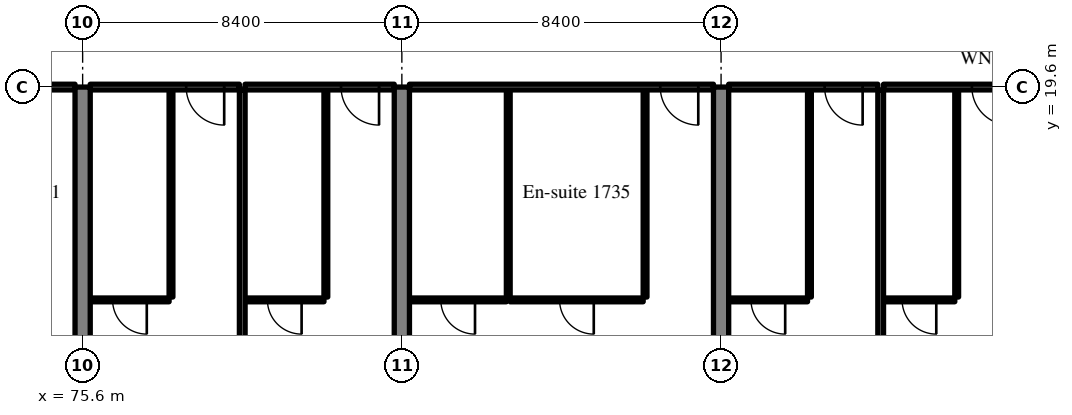
"""IFC4 building model, lengths in metres.
Left out: names, types, materials, properties, quantities, classifications, styles, units other than length and angle.
Written with IfcOpenShell. Run it as: python <this file> out.ifc"""

import sys

from ifc_helpers import new_model, si_unit, direction, frame, frame_2d, origin, place, context, subcontext, project, spatial, rectangle, extrude, source, transform, mapped, element, fill, save


model = new_model("IFC4")
c1 = context("Model", 3, precision=1e-05, world=origin(), true_north=direction((0.0, 1.0)))
c2 = subcontext(c1, "Body", "Model", "MODEL_VIEW")
j1 = project(units=[si_unit("LENGTHUNIT", "METRE"), si_unit("PLANEANGLEUNIT", "RADIAN")], contexts=[c1])
p1 = place(None, origin())
s1 = spatial("IfcSite", under=j1, at=p1, CompositionType="ELEMENT")
p2 = place(p1, origin())
s2 = spatial("IfcBuilding", under=s1, at=p2, CompositionType="ELEMENT")
p3 = place(p2, frame((0.0, 0.0, 73.4)))
s3 = spatial("IfcBuildingStorey", under=s2, at=p3, CompositionType="ELEMENT", Elevation=73.4)
m1 = source(origin(), c2, "Body", "SweptSolid", [
    extrude(rectangle(XDim=19.6, YDim=0.4, at=frame_2d((9.8, 0.0))), origin(), (0.0, 0.0, 1.0), 3.52),
])
for number, where, z_axis, x_axis in (
    (1, (75.6, 0.0, 0.0), (0.0, 0.0, 1.0), (0.0, 1.0, 0.0)),
    (2, (84.0, 0.0, 0.0), (0.0, 0.0, 1.0), (0.0, 1.0, 0.0)),
    (3, (92.4, 0.0, 0.0), (0.0, 0.0, 1.0), (0.0, 1.0, 0.0)),
):
    element("IfcWall", number, at=place(p3, frame(where, z_axis=z_axis, x_axis=x_axis)), inside=s3, PredefinedType="SHEAR", context=c2, shape_type="MappedRepresentation", body=[
        mapped(m1, transform((0.0, 0.0, 0.0), scale=1.0)),
    ])
m2 = source(origin(), c2, "Body", "SweptSolid", [
    extrude(rectangle(XDim=8.0, YDim=0.15, at=frame_2d((4.0, 0.0))), origin(), (0.0, 0.0, 1.0), 2.82),
])
p4 = place(p3, frame((67.4, 19.6, 0.0), z_axis=(0.0, 0.0, 1.0), x_axis=(1.0, 0.0, 0.0)))
e4 = element("IfcWall", 4, at=p4, inside=s3, PredefinedType="PARTITIONING", context=c2, shape_type="MappedRepresentation", body=[
    mapped(m2, transform((0.0, 0.0, 0.0), scale=1.0)),
])
m3 = source(origin(), c2, "Body", "SweptSolid", [
    extrude(rectangle(XDim=1.8, YDim=2.1, at=frame_2d((0.9, 1.05))), frame((0.0, 0.085, 0.0), z_axis=(0.0, -1.0, 0.0), x_axis=(1.0, 0.0, 0.0)), (0.0, 0.0, 1.0), 0.17),
])
p5 = place(p4, frame((3.1, 0.0, 0.0)))
e5 = element("IfcOpeningElement", 5, at=p5, cuts=e4, PredefinedType="OPENING", context=c2, shape_type="MappedRepresentation", body=[
    mapped(m3, transform((0.0, 0.0, 0.0), scale=1.0)),
])
m4 = source(origin(), c2, "Body", "SweptSolid", [
    extrude(rectangle(XDim=5.45, YDim=0.1, at=frame_2d((2.725, 0.0))), origin(), (0.0, 0.0, 1.0), 3.52),
])
p6 = place(p3, frame((77.925, 14.075, 0.0), z_axis=(0.0, 0.0, 1.0), x_axis=(0.0, 1.0, 0.0)))
e6 = element("IfcWall", 6, at=p6, inside=s3, PredefinedType="PARTITIONING", context=c2, shape_type="MappedRepresentation", body=[
    mapped(m4, transform((0.0, 0.0, 0.0), scale=1.0)),
])
m5 = source(origin(), c2, "Body", "SweptSolid", [
    extrude(rectangle(XDim=2.075, YDim=0.1, at=frame_2d((1.038, 0.0))), origin(), (0.0, 0.0, 1.0), 3.52),
])
p7 = place(p3, frame((75.8, 14.0, 0.0), z_axis=(0.0, 0.0, 1.0), x_axis=(1.0, 0.0, 0.0)))
e7 = element("IfcWall", 7, at=p7, inside=s3, PredefinedType="PARTITIONING", context=c2, shape_type="MappedRepresentation", body=[
    mapped(m5, transform((0.0, 0.0, 0.0), scale=1.0)),
])
m6 = source(origin(), c2, "Body", "SweptSolid", [
    extrude(rectangle(XDim=0.9, YDim=2.1, at=frame_2d((0.45, 1.05))), frame((0.0, 0.06, 0.0), z_axis=(0.0, -1.0, 0.0), x_axis=(1.0, 0.0, 0.0)), (0.0, 0.0, 1.0), 0.12),
])
p8 = place(p7, frame((0.588, 0.0, 0.0)))
e8 = element("IfcOpeningElement", 8, at=p8, cuts=e7, PredefinedType="OPENING", context=c2, shape_type="MappedRepresentation", body=[
    mapped(m6, transform((0.0, 0.0, 0.0), scale=1.0)),
])
m7 = source(origin(), c2, "Body", "SweptSolid", [
    extrude(rectangle(XDim=3.925, YDim=0.15, at=frame_2d((1.962, 0.0))), origin(), (0.0, 0.0, 1.0), 2.82),
])
p9 = place(p3, frame((75.8, 19.6, 0.0), z_axis=(0.0, 0.0, 1.0), x_axis=(1.0, 0.0, 0.0)))
e9 = element("IfcWall", 9, at=p9, inside=s3, PredefinedType="PARTITIONING", context=c2, shape_type="MappedRepresentation", body=[
    mapped(m7, transform((0.0, 0.0, 0.0), scale=1.0)),
])
m8 = source(origin(), c2, "Body", "SweptSolid", [
    extrude(rectangle(XDim=1.0, YDim=2.1, at=frame_2d((0.5, 1.05))), frame((0.0, 0.085, 0.0), z_axis=(0.0, -1.0, 0.0), x_axis=(1.0, 0.0, 0.0)), (0.0, 0.0, 1.0), 0.17),
])
p10 = place(p9, frame((2.525, 0.0, 0.0)))
e10 = element("IfcOpeningElement", 10, at=p10, cuts=e9, PredefinedType="OPENING", context=c2, shape_type="MappedRepresentation", body=[
    mapped(m8, transform((0.0, 0.0, 0.0), scale=1.0)),
])
p11 = place(p3, frame((82.0, 14.075, 0.0), z_axis=(0.0, 0.0, 1.0), x_axis=(0.0, 1.0, 0.0)))
e11 = element("IfcWall", 11, at=p11, inside=s3, PredefinedType="PARTITIONING", context=c2, shape_type="MappedRepresentation", body=[
    mapped(m4, transform((0.0, 0.0, 0.0), scale=1.0)),
])
p12 = place(p3, frame((79.875, 14.0, 0.0), z_axis=(0.0, 0.0, 1.0), x_axis=(1.0, 0.0, 0.0)))
e12 = element("IfcWall", 12, at=p12, inside=s3, PredefinedType="PARTITIONING", context=c2, shape_type="MappedRepresentation", body=[
    mapped(m5, transform((0.0, 0.0, 0.0), scale=1.0)),
])
p13 = place(p12, frame((0.587, 0.0, 0.0)))
e13 = element("IfcOpeningElement", 13, at=p13, cuts=e12, PredefinedType="OPENING", context=c2, shape_type="MappedRepresentation", body=[
    mapped(m6, transform((0.0, 0.0, 0.0), scale=1.0)),
])
p14 = place(p3, frame((79.875, 19.6, 0.0), z_axis=(0.0, 0.0, 1.0), x_axis=(1.0, 0.0, 0.0)))
e14 = element("IfcWall", 14, at=p14, inside=s3, PredefinedType="PARTITIONING", context=c2, shape_type="MappedRepresentation", body=[
    mapped(m7, transform((0.0, 0.0, 0.0), scale=1.0)),
])
p15 = place(p14, frame((2.525, 0.0, 0.0)))
e15 = element("IfcOpeningElement", 15, at=p15, cuts=e14, PredefinedType="OPENING", context=c2, shape_type="MappedRepresentation", body=[
    mapped(m8, transform((0.0, 0.0, 0.0), scale=1.0)),
])
m9 = source(origin(), c2, "Body", "SweptSolid", [
    extrude(rectangle(XDim=18.725, YDim=0.15, at=frame_2d((9.362, 0.0))), origin(), (0.0, 0.0, 1.0), 3.52),
])
p16 = place(p3, frame((79.8, 0.8, 0.0), z_axis=(0.0, 0.0, 1.0), x_axis=(0.0, 1.0, 0.0)))
e16 = element("IfcWall", 16, at=p16, inside=s3, PredefinedType="PARTITIONING", context=c2, shape_type="MappedRepresentation", body=[
    mapped(m9, transform((0.0, 0.0, 0.0), scale=1.0)),
])
for number, where, z_axis, x_axis in (
    (17, (90.4, 14.075, 0.0), (0.0, 0.0, 1.0), (0.0, 1.0, 0.0)),
    (18, (86.8, 14.075, 0.0), (0.0, 0.0, 1.0), (0.0, 1.0, 0.0)),
):
    element("IfcWall", number, at=place(p3, frame(where, z_axis=z_axis, x_axis=x_axis)), inside=s3, PredefinedType="PARTITIONING", context=c2, shape_type="MappedRepresentation", body=[
        mapped(m4, transform((0.0, 0.0, 0.0), scale=1.0)),
    ])
m10 = source(origin(), c2, "Body", "SweptSolid", [
    extrude(rectangle(XDim=3.5, YDim=0.1, at=frame_2d((1.75, 0.0))), origin(), (0.0, 0.0, 1.0), 3.52),
])
p17 = place(p3, frame((86.85, 14.0, 0.0), z_axis=(0.0, 0.0, 1.0), x_axis=(1.0, 0.0, 0.0)))
e19 = element("IfcWall", 19, at=p17, inside=s3, PredefinedType="PARTITIONING", context=c2, shape_type="MappedRepresentation", body=[
    mapped(m10, transform((0.0, 0.0, 0.0), scale=1.0)),
])
p18 = place(p17, frame((1.3, 0.0, 0.0)))
e20 = element("IfcOpeningElement", 20, at=p18, cuts=e19, PredefinedType="OPENING", context=c2, shape_type="MappedRepresentation", body=[
    mapped(m6, transform((0.0, 0.0, 0.0), scale=1.0)),
])
m11 = source(origin(), c2, "Body", "SweptSolid", [
    extrude(rectangle(XDim=2.55, YDim=0.1, at=frame_2d((1.275, 0.0))), origin(), (0.0, 0.0, 1.0), 3.52),
])
p19 = place(p3, frame((84.2, 14.0, 0.0), z_axis=(0.0, 0.0, 1.0), x_axis=(1.0, 0.0, 0.0)))
e21 = element("IfcWall", 21, at=p19, inside=s3, PredefinedType="PARTITIONING", context=c2, shape_type="MappedRepresentation", body=[
    mapped(m11, transform((0.0, 0.0, 0.0), scale=1.0)),
])
p20 = place(p19, frame((0.825, 0.0, 0.0)))
e22 = element("IfcOpeningElement", 22, at=p20, cuts=e21, PredefinedType="OPENING", context=c2, shape_type="MappedRepresentation", body=[
    mapped(m6, transform((0.0, 0.0, 0.0), scale=1.0)),
])
p21 = place(p3, frame((84.2, 19.6, 0.0), z_axis=(0.0, 0.0, 1.0), x_axis=(1.0, 0.0, 0.0)))
e23 = element("IfcWall", 23, at=p21, inside=s3, PredefinedType="PARTITIONING", context=c2, shape_type="MappedRepresentation", body=[
    mapped(m2, transform((0.0, 0.0, 0.0), scale=1.0)),
])
p22 = place(p21, frame((6.6, 0.0, 0.0)))
e24 = element("IfcOpeningElement", 24, at=p22, cuts=e23, PredefinedType="OPENING", context=c2, shape_type="MappedRepresentation", body=[
    mapped(m8, transform((0.0, 0.0, 0.0), scale=1.0)),
])
p23 = place(p3, frame((94.725, 14.075, 0.0), z_axis=(0.0, 0.0, 1.0), x_axis=(0.0, 1.0, 0.0)))
e25 = element("IfcWall", 25, at=p23, inside=s3, PredefinedType="PARTITIONING", context=c2, shape_type="MappedRepresentation", body=[
    mapped(m4, transform((0.0, 0.0, 0.0), scale=1.0)),
])
p24 = place(p3, frame((92.6, 14.0, 0.0), z_axis=(0.0, 0.0, 1.0), x_axis=(1.0, 0.0, 0.0)))
e26 = element("IfcWall", 26, at=p24, inside=s3, PredefinedType="PARTITIONING", context=c2, shape_type="MappedRepresentation", body=[
    mapped(m5, transform((0.0, 0.0, 0.0), scale=1.0)),
])
p25 = place(p24, frame((0.587, 0.0, 0.0)))
e27 = element("IfcOpeningElement", 27, at=p25, cuts=e26, PredefinedType="OPENING", context=c2, shape_type="MappedRepresentation", body=[
    mapped(m6, transform((0.0, 0.0, 0.0), scale=1.0)),
])
m12 = source(origin(), c2, "Body", "SweptSolid", [
    extrude(rectangle(XDim=3.925, YDim=0.15, at=frame_2d((1.962, 0.0))), origin(), (0.0, 0.0, 1.0), 2.82),
])
p26 = place(p3, frame((92.6, 19.6, 0.0), z_axis=(0.0, 0.0, 1.0), x_axis=(1.0, 0.0, 0.0)))
e28 = element("IfcWall", 28, at=p26, inside=s3, PredefinedType="PARTITIONING", context=c2, shape_type="MappedRepresentation", body=[
    mapped(m12, transform((0.0, 0.0, 0.0), scale=1.0)),
])
p27 = place(p26, frame((2.525, 0.0, 0.0)))
e29 = element("IfcOpeningElement", 29, at=p27, cuts=e28, PredefinedType="OPENING", context=c2, shape_type="MappedRepresentation", body=[
    mapped(m8, transform((0.0, 0.0, 0.0), scale=1.0)),
])
p28 = place(p3, frame((98.6, 14.075, 0.0), z_axis=(0.0, 0.0, 1.0), x_axis=(0.0, 1.0, 0.0)))
e30 = element("IfcWall", 30, at=p28, inside=s3, PredefinedType="PARTITIONING", context=c2, shape_type="MappedRepresentation", body=[
    mapped(m4, transform((0.0, 0.0, 0.0), scale=1.0)),
])
m13 = source(origin(), c2, "Body", "SweptSolid", [
    extrude(rectangle(XDim=1.875, YDim=0.1, at=frame_2d((0.938, 0.0))), origin(), (0.0, 0.0, 1.0), 3.52),
])
p29 = place(p3, frame((96.675, 14.0, 0.0), z_axis=(0.0, 0.0, 1.0), x_axis=(1.0, 0.0, 0.0)))
e31 = element("IfcWall", 31, at=p29, inside=s3, PredefinedType="PARTITIONING", context=c2, shape_type="MappedRepresentation", body=[
    mapped(m13, transform((0.0, 0.0, 0.0), scale=1.0)),
])
p30 = place(p29, frame((0.488, 0.0, 0.0)))
e32 = element("IfcOpeningElement", 32, at=p30, cuts=e31, PredefinedType="OPENING", context=c2, shape_type="MappedRepresentation", body=[
    mapped(m6, transform((0.0, 0.0, 0.0), scale=1.0)),
])
m14 = source(origin(), c2, "Body", "SweptSolid", [
    extrude(rectangle(XDim=3.725, YDim=0.15, at=frame_2d((1.862, 0.0))), origin(), (0.0, 0.0, 1.0), 2.82),
])
p31 = place(p3, frame((96.675, 19.6, 0.0), z_axis=(0.0, 0.0, 1.0), x_axis=(1.0, 0.0, 0.0)))
e33 = element("IfcWall", 33, at=p31, inside=s3, PredefinedType="PARTITIONING", context=c2, shape_type="MappedRepresentation", body=[
    mapped(m14, transform((0.0, 0.0, 0.0), scale=1.0)),
])
p32 = place(p31, frame((2.325, 0.0, 0.0)))
e34 = element("IfcOpeningElement", 34, at=p32, cuts=e33, PredefinedType="OPENING", context=c2, shape_type="MappedRepresentation", body=[
    mapped(m8, transform((0.0, 0.0, 0.0), scale=1.0)),
])
m15 = source(origin(), c2, "Body", "SweptSolid", [
    extrude(rectangle(XDim=18.947, YDim=0.15, at=frame_2d((9.474, 0.0))), origin(), (0.0, 0.0, 1.0), 3.52),
])
p33 = place(p3, frame((96.6, 0.578, 0.0), z_axis=(0.0, 0.0, 1.0), x_axis=(0.0, 1.0, 0.0)))
e35 = element("IfcWall", 35, at=p33, inside=s3, PredefinedType="PARTITIONING", context=c2, shape_type="MappedRepresentation", body=[
    mapped(m15, transform((0.0, 0.0, 0.0), scale=1.0)),
])
m16 = source(origin(), c2, "Body", "SweptSolid", [
    extrude(rectangle(XDim=0.9, YDim=2.1, at=frame_2d((0.45, 1.05))), frame((0.0, 0.025, 0.0), z_axis=(0.0, -1.0, 0.0), x_axis=(1.0, 0.0, 0.0)), (0.0, 0.0, 1.0), 0.05),
])
p34 = place(p8, origin())
e36 = element("IfcDoor", 36, at=p34, inside=s3, OperationType="SINGLE_SWING_RIGHT", PredefinedType="DOOR", context=c2, shape_type="MappedRepresentation", body=[
    mapped(m16, transform((0.0, 0.0, 0.0), scale=1.0)),
])
fill(e8, e36)
m17 = source(origin(), c2, "Body", "SweptSolid", [
    extrude(rectangle(XDim=1.0, YDim=2.1, at=frame_2d((0.5, 1.05))), frame((0.0, 0.025, 0.0), z_axis=(0.0, -1.0, 0.0), x_axis=(1.0, 0.0, 0.0)), (0.0, 0.0, 1.0), 0.05),
])
p35 = place(p10, origin())
e37 = element("IfcDoor", 37, at=p35, inside=s3, OperationType="SINGLE_SWING_RIGHT", PredefinedType="DOOR", context=c2, shape_type="MappedRepresentation", body=[
    mapped(m17, transform((0.0, 0.0, 0.0), scale=1.0)),
])
fill(e10, e37)
p36 = place(p13, origin())
e38 = element("IfcDoor", 38, at=p36, inside=s3, OperationType="SINGLE_SWING_RIGHT", PredefinedType="DOOR", context=c2, shape_type="MappedRepresentation", body=[
    mapped(m16, transform((0.0, 0.0, 0.0), scale=1.0)),
])
fill(e13, e38)
p37 = place(p15, origin())
e39 = element("IfcDoor", 39, at=p37, inside=s3, OperationType="SINGLE_SWING_RIGHT", PredefinedType="DOOR", context=c2, shape_type="MappedRepresentation", body=[
    mapped(m17, transform((0.0, 0.0, 0.0), scale=1.0)),
])
fill(e15, e39)
p38 = place(p18, origin())
e40 = element("IfcDoor", 40, at=p38, inside=s3, OperationType="SINGLE_SWING_RIGHT", PredefinedType="DOOR", context=c2, shape_type="MappedRepresentation", body=[
    mapped(m16, transform((0.0, 0.0, 0.0), scale=1.0)),
])
fill(e20, e40)
p39 = place(p20, origin())
e41 = element("IfcDoor", 41, at=p39, inside=s3, OperationType="SINGLE_SWING_RIGHT", PredefinedType="DOOR", context=c2, shape_type="MappedRepresentation", body=[
    mapped(m16, transform((0.0, 0.0, 0.0), scale=1.0)),
])
fill(e22, e41)
p40 = place(p22, origin())
e42 = element("IfcDoor", 42, at=p40, inside=s3, OperationType="SINGLE_SWING_RIGHT", PredefinedType="DOOR", context=c2, shape_type="MappedRepresentation", body=[
    mapped(m17, transform((0.0, 0.0, 0.0), scale=1.0)),
])
fill(e24, e42)
p41 = place(p25, origin())
e43 = element("IfcDoor", 43, at=p41, inside=s3, OperationType="SINGLE_SWING_RIGHT", PredefinedType="DOOR", context=c2, shape_type="MappedRepresentation", body=[
    mapped(m16, transform((0.0, 0.0, 0.0), scale=1.0)),
])
fill(e27, e43)
p42 = place(p27, origin())
e44 = element("IfcDoor", 44, at=p42, inside=s3, OperationType="SINGLE_SWING_RIGHT", PredefinedType="DOOR", context=c2, shape_type="MappedRepresentation", body=[
    mapped(m17, transform((0.0, 0.0, 0.0), scale=1.0)),
])
fill(e29, e44)
p43 = place(p30, origin())
e45 = element("IfcDoor", 45, at=p43, inside=s3, OperationType="SINGLE_SWING_RIGHT", PredefinedType="DOOR", context=c2, shape_type="MappedRepresentation", body=[
    mapped(m16, transform((0.0, 0.0, 0.0), scale=1.0)),
])
fill(e32, e45)
p44 = place(p32, origin())
e46 = element("IfcDoor", 46, at=p44, inside=s3, OperationType="SINGLE_SWING_RIGHT", PredefinedType="DOOR", context=c2, shape_type="MappedRepresentation", body=[
    mapped(m17, transform((0.0, 0.0, 0.0), scale=1.0)),
])
fill(e34, e46)
save(model, sys.argv[1])
